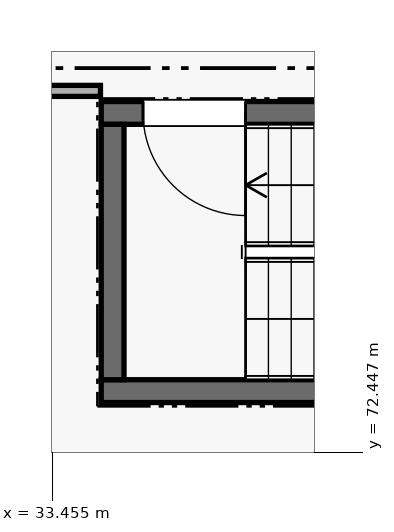
"""IFC4 building model, lengths in metres.
Left out: names, types, materials, properties, quantities, classifications, styles, units other than length and angle.
Written with IfcOpenShell. Run it as: python <this file> out.ifc"""

import sys

from ifc_helpers import new_model, si_unit, direction, frame, frame_2d, origin, place, context, subcontext, project, spatial, rectangle, extrude, element, fill, save


model = new_model("IFC4")
c1 = context("Model", 3, precision=1e-05, world=origin(), true_north=direction((0.0, 1.0)))
c2 = subcontext(c1, "Body", "Model", "MODEL_VIEW")
j1 = project(units=[si_unit("LENGTHUNIT", "METRE"), si_unit("PLANEANGLEUNIT", "RADIAN")], contexts=[c1])
p1 = place(None, origin())
s1 = spatial("IfcSite", under=j1, at=p1, CompositionType="ELEMENT")
p2 = place(p1, origin())
s2 = spatial("IfcBuilding", under=s1, at=p2, CompositionType="ELEMENT")
p3 = place(p2, frame((0.0, 0.0, 9.9)))
s3 = spatial("IfcBuildingStorey", under=s2, at=p3, CompositionType="ELEMENT", Elevation=9.9)
p4 = place(p3, frame((34.1, 73.25, 0.0), z_axis=(0.0, 0.0, 1.0), x_axis=(1.0, 0.0, 0.0)))
e1 = element("IfcWall", 1, at=p4, inside=s3, PredefinedType="SHEAR", context=c2, shape_type="SweptSolid", body=[
    extrude(rectangle(XDim=8.65, YDim=0.3, at=frame_2d((4.325, 0.0))), origin(), (0.0, 0.0, 1.0), 3.98),
])
p5 = place(p3, frame((42.75, 76.91, 0.0), z_axis=(0.0, 0.0, 1.0), x_axis=(-1.0, 0.0, 0.0)))
e2 = element("IfcWall", 2, at=p5, inside=s3, PredefinedType="SHEAR", context=c2, shape_type="SweptSolid", body=[
    extrude(rectangle(XDim=8.65, YDim=0.3, at=frame_2d((4.325, 0.0))), origin(), (0.0, 0.0, 1.0), 3.98),
])
p6 = place(p5, frame((6.75, 0.0, 0.0)))
e3 = element("IfcOpeningElement", 3, at=p6, cuts=e2, PredefinedType="OPENING", context=c2, shape_type="SweptSolid", body=[
    extrude(rectangle(XDim=1.35, YDim=2.2, at=frame_2d((0.675, 1.1))), frame((0.0, 0.16, 0.0), z_axis=(0.0, -1.0, 0.0), x_axis=(1.0, 0.0, 0.0)), (0.0, 0.0, 1.0), 0.32),
])
p7 = place(p3, frame((34.25, 76.76, 0.0), z_axis=(0.0, 0.0, 1.0), x_axis=(0.0, -1.0, 0.0)))
e4 = element("IfcWall", 4, at=p7, inside=s3, PredefinedType="SHEAR", context=c2, shape_type="SweptSolid", body=[
    extrude(rectangle(XDim=3.36, YDim=0.3, at=frame_2d((1.68, 0.0))), origin(), (0.0, 0.0, 1.0), 3.98),
])
p8 = place(p3, frame((22.16, 77.2, 0.0), z_axis=(0.0, 0.0, 1.0), x_axis=(1.0, 0.0, 0.0)))
e5 = element("IfcWall", 5, at=p8, inside=s3, PredefinedType="PARTITIONING", context=c2, shape_type="SweptSolid", body=[
    extrude(rectangle(XDim=11.93, YDim=0.145, at=frame_2d((5.965, 0.0))), origin(), (0.0, 0.0, 1.0), 3.525),
])
p9 = place(p8, frame((4.5, 0.0, 0.0)))
e6 = element("IfcOpeningElement", 6, at=p9, cuts=e5, PredefinedType="OPENING", context=c2, shape_type="SweptSolid", body=[
    extrude(rectangle(XDim=1.05, YDim=2.2, at=frame_2d((0.525, 1.1))), frame((0.0, 0.083, 0.0), z_axis=(0.0, -1.0, 0.0), x_axis=(1.0, 0.0, 0.0)), (0.0, 0.0, 1.0), 0.165),
])
p10 = place(p6, origin())
e7 = element("IfcDoor", 7, at=p10, inside=s3, OperationType="SINGLE_SWING_LEFT", PredefinedType="DOOR", context=c2, shape_type="SweptSolid", body=[
    extrude(rectangle(XDim=1.35, YDim=2.2, at=frame_2d((0.675, 1.1))), frame((0.0, 0.025, 0.0), z_axis=(0.0, -1.0, 0.0), x_axis=(1.0, 0.0, 0.0)), (0.0, 0.0, 1.0), 0.05),
])
fill(e3, e7)
save(model, sys.argv[1])
